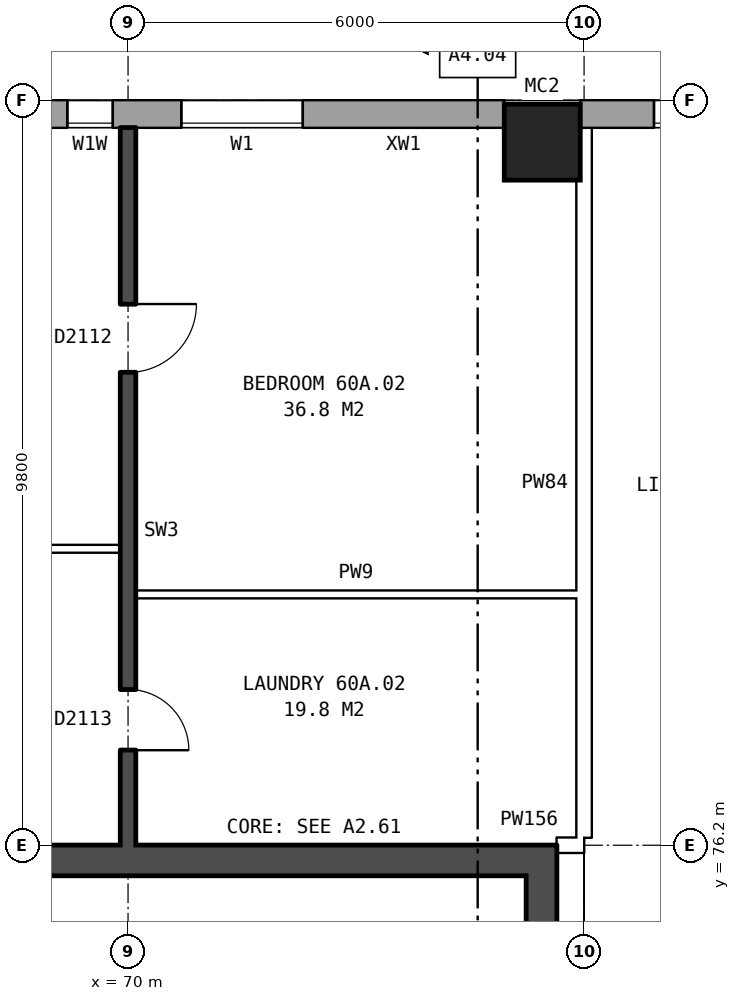
"""IFC4 building model, lengths in metres.
Left out: names, types, materials, properties, quantities, classifications, styles, units other than length and angle.
Written with IfcOpenShell. Run it as: python <this file> out.ifc"""

import sys

from ifc_helpers import new_model, si_unit, direction, frame, frame_2d, origin, origin_2d, place, context, subcontext, project, spatial, rectangle, hollow_rectangle, extrude, element, fill, save


model = new_model("IFC4")
c1 = context("Model", 3, precision=1e-05, world=origin(), true_north=direction((0.0, 1.0)))
c2 = subcontext(c1, "Body", "Model", "MODEL_VIEW")
j1 = project(units=[si_unit("LENGTHUNIT", "METRE"), si_unit("PLANEANGLEUNIT", "RADIAN")], contexts=[c1])
p1 = place(None, origin())
s1 = spatial("IfcSite", under=j1, at=p1, CompositionType="ELEMENT")
p2 = place(p1, origin())
s2 = spatial("IfcBuilding", under=s1, at=p2, CompositionType="ELEMENT")
p3 = place(p2, frame((0.0, 0.0, 212.1)))
s3 = spatial("IfcBuildingStorey", under=s2, at=p3, CompositionType="ELEMENT", Elevation=212.1)
p4 = place(p3, frame((75.45, 85.45, 0.0), z_axis=(0.0, 0.0, 1.0), x_axis=(1.0, 0.0, 0.0)))
e1 = element("IfcColumn", 1, at=p4, inside=s3, PredefinedType="COLUMN", context=c2, shape_type="SweptSolid", body=[
    extrude(hollow_rectangle(XDim=1.0, YDim=1.0, WallThickness=0.055, at=origin_2d()), origin(), (0.0, 0.0, 1.0), 3.1),
])
p5 = place(p3, frame((131.05, 85.82, 0.0), z_axis=(0.0, 0.0, 1.0), x_axis=(-1.0, 0.0, 0.0)))
e2 = element("IfcWall", 2, at=p5, inside=s3, PredefinedType="STANDARD", context=c2, shape_type="SweptSolid", body=[
    extrude(rectangle(XDim=55.1, YDim=0.36, at=frame_2d((27.55, 0.0))), origin(), (0.0, 0.0, 1.0), 2.85),
])
p6 = place(p5, frame((0.969, 0.0, 0.8)))
e3 = element("IfcOpeningElement", 3, at=p6, cuts=e2, PredefinedType="OPENING", context=c2, shape_type="SweptSolid", body=[
    extrude(rectangle(XDim=1.6, YDim=1.8, at=frame_2d((0.8, 0.9))), frame((0.0, 0.19, 0.0), z_axis=(0.0, -1.0, 0.0), x_axis=(1.0, 0.0, 0.0)), (0.0, 0.0, 1.0), 0.38),
])
p7 = place(p5, frame((4.406, 0.0, 0.8)))
e4 = element("IfcOpeningElement", 4, at=p7, cuts=e2, PredefinedType="OPENING", context=c2, shape_type="SweptSolid", body=[
    extrude(rectangle(XDim=1.6, YDim=1.8, at=frame_2d((0.8, 0.9))), frame((0.0, 0.19, 0.0), z_axis=(0.0, -1.0, 0.0), x_axis=(1.0, 0.0, 0.0)), (0.0, 0.0, 1.0), 0.38),
])
p8 = place(p5, frame((7.844, 0.0, 0.8)))
e5 = element("IfcOpeningElement", 5, at=p8, cuts=e2, PredefinedType="OPENING", context=c2, shape_type="SweptSolid", body=[
    extrude(rectangle(XDim=1.6, YDim=1.8, at=frame_2d((0.8, 0.9))), frame((0.0, 0.19, 0.0), z_axis=(0.0, -1.0, 0.0), x_axis=(1.0, 0.0, 0.0)), (0.0, 0.0, 1.0), 0.38),
])
p9 = place(p5, frame((11.281, 0.0, 0.8)))
e6 = element("IfcOpeningElement", 6, at=p9, cuts=e2, PredefinedType="OPENING", context=c2, shape_type="SweptSolid", body=[
    extrude(rectangle(XDim=1.6, YDim=1.8, at=frame_2d((0.8, 0.9))), frame((0.0, 0.19, 0.0), z_axis=(0.0, -1.0, 0.0), x_axis=(1.0, 0.0, 0.0)), (0.0, 0.0, 1.0), 0.38),
])
p10 = place(p5, frame((14.719, 0.0, 0.8)))
e7 = element("IfcOpeningElement", 7, at=p10, cuts=e2, PredefinedType="OPENING", context=c2, shape_type="SweptSolid", body=[
    extrude(rectangle(XDim=1.6, YDim=1.8, at=frame_2d((0.8, 0.9))), frame((0.0, 0.19, 0.0), z_axis=(0.0, -1.0, 0.0), x_axis=(1.0, 0.0, 0.0)), (0.0, 0.0, 1.0), 0.38),
])
p11 = place(p5, frame((18.156, 0.0, 0.8)))
e8 = element("IfcOpeningElement", 8, at=p11, cuts=e2, PredefinedType="OPENING", context=c2, shape_type="SweptSolid", body=[
    extrude(rectangle(XDim=1.6, YDim=1.8, at=frame_2d((0.8, 0.9))), frame((0.0, 0.19, 0.0), z_axis=(0.0, -1.0, 0.0), x_axis=(1.0, 0.0, 0.0)), (0.0, 0.0, 1.0), 0.38),
])
p12 = place(p5, frame((21.594, 0.0, 0.8)))
e9 = element("IfcOpeningElement", 9, at=p12, cuts=e2, PredefinedType="OPENING", context=c2, shape_type="SweptSolid", body=[
    extrude(rectangle(XDim=1.6, YDim=1.8, at=frame_2d((0.8, 0.9))), frame((0.0, 0.19, 0.0), z_axis=(0.0, -1.0, 0.0), x_axis=(1.0, 0.0, 0.0)), (0.0, 0.0, 1.0), 0.38),
])
p13 = place(p5, frame((25.031, 0.0, 0.8)))
e10 = element("IfcOpeningElement", 10, at=p13, cuts=e2, PredefinedType="OPENING", context=c2, shape_type="SweptSolid", body=[
    extrude(rectangle(XDim=1.6, YDim=1.8, at=frame_2d((0.8, 0.9))), frame((0.0, 0.19, 0.0), z_axis=(0.0, -1.0, 0.0), x_axis=(1.0, 0.0, 0.0)), (0.0, 0.0, 1.0), 0.38),
])
p14 = place(p5, frame((28.469, 0.0, 0.8)))
e11 = element("IfcOpeningElement", 11, at=p14, cuts=e2, PredefinedType="OPENING", context=c2, shape_type="SweptSolid", body=[
    extrude(rectangle(XDim=1.6, YDim=1.8, at=frame_2d((0.8, 0.9))), frame((0.0, 0.19, 0.0), z_axis=(0.0, -1.0, 0.0), x_axis=(1.0, 0.0, 0.0)), (0.0, 0.0, 1.0), 0.38),
])
p15 = place(p5, frame((31.906, 0.0, 0.8)))
e12 = element("IfcOpeningElement", 12, at=p15, cuts=e2, PredefinedType="OPENING", context=c2, shape_type="SweptSolid", body=[
    extrude(rectangle(XDim=1.6, YDim=1.8, at=frame_2d((0.8, 0.9))), frame((0.0, 0.19, 0.0), z_axis=(0.0, -1.0, 0.0), x_axis=(1.0, 0.0, 0.0)), (0.0, 0.0, 1.0), 0.38),
])
p16 = place(p5, frame((35.344, 0.0, 0.8)))
e13 = element("IfcOpeningElement", 13, at=p16, cuts=e2, PredefinedType="OPENING", context=c2, shape_type="SweptSolid", body=[
    extrude(rectangle(XDim=1.6, YDim=1.8, at=frame_2d((0.8, 0.9))), frame((0.0, 0.19, 0.0), z_axis=(0.0, -1.0, 0.0), x_axis=(1.0, 0.0, 0.0)), (0.0, 0.0, 1.0), 0.38),
])
p17 = place(p5, frame((38.781, 0.0, 0.8)))
e14 = element("IfcOpeningElement", 14, at=p17, cuts=e2, PredefinedType="OPENING", context=c2, shape_type="SweptSolid", body=[
    extrude(rectangle(XDim=1.6, YDim=1.8, at=frame_2d((0.8, 0.9))), frame((0.0, 0.19, 0.0), z_axis=(0.0, -1.0, 0.0), x_axis=(1.0, 0.0, 0.0)), (0.0, 0.0, 1.0), 0.38),
])
p18 = place(p5, frame((42.219, 0.0, 0.8)))
e15 = element("IfcOpeningElement", 15, at=p18, cuts=e2, PredefinedType="OPENING", context=c2, shape_type="SweptSolid", body=[
    extrude(rectangle(XDim=1.6, YDim=1.8, at=frame_2d((0.8, 0.9))), frame((0.0, 0.19, 0.0), z_axis=(0.0, -1.0, 0.0), x_axis=(1.0, 0.0, 0.0)), (0.0, 0.0, 1.0), 0.38),
])
p19 = place(p5, frame((45.656, 0.0, 0.8)))
e16 = element("IfcOpeningElement", 16, at=p19, cuts=e2, PredefinedType="OPENING", context=c2, shape_type="SweptSolid", body=[
    extrude(rectangle(XDim=1.6, YDim=1.8, at=frame_2d((0.8, 0.9))), frame((0.0, 0.19, 0.0), z_axis=(0.0, -1.0, 0.0), x_axis=(1.0, 0.0, 0.0)), (0.0, 0.0, 1.0), 0.38),
])
p20 = place(p5, frame((49.094, 0.0, 0.8)))
e17 = element("IfcOpeningElement", 17, at=p20, cuts=e2, PredefinedType="OPENING", context=c2, shape_type="SweptSolid", body=[
    extrude(rectangle(XDim=1.6, YDim=1.8, at=frame_2d((0.8, 0.9))), frame((0.0, 0.19, 0.0), z_axis=(0.0, -1.0, 0.0), x_axis=(1.0, 0.0, 0.0)), (0.0, 0.0, 1.0), 0.38),
])
p21 = place(p5, frame((52.531, 0.0, 0.8)))
e18 = element("IfcOpeningElement", 18, at=p21, cuts=e2, PredefinedType="OPENING", context=c2, shape_type="SweptSolid", body=[
    extrude(rectangle(XDim=1.6, YDim=1.8, at=frame_2d((0.8, 0.9))), frame((0.0, 0.19, 0.0), z_axis=(0.0, -1.0, 0.0), x_axis=(1.0, 0.0, 0.0)), (0.0, 0.0, 1.0), 0.38),
])
p22 = place(p3, frame((74.95, 85.82, 0.0), z_axis=(0.0, 0.0, 1.0), x_axis=(-1.0, 0.0, 0.0)))
e19 = element("IfcWall", 19, at=p22, inside=s3, PredefinedType="STANDARD", context=c2, shape_type="SweptSolid", body=[
    extrude(rectangle(XDim=39.875, YDim=0.36, at=frame_2d((19.938, 0.0))), origin(), (0.0, 0.0, 1.0), 2.85),
])
p23 = place(p22, frame((2.65, 0.0, 0.8)))
e20 = element("IfcOpeningElement", 20, at=p23, cuts=e19, PredefinedType="OPENING", context=c2, shape_type="SweptSolid", body=[
    extrude(rectangle(XDim=1.6, YDim=1.8, at=frame_2d((0.8, 0.9))), frame((0.0, 0.19, 0.0), z_axis=(0.0, -1.0, 0.0), x_axis=(1.0, 0.0, 0.0)), (0.0, 0.0, 1.0), 0.38),
])
p24 = place(p22, frame((5.15, 0.0, 1.5)))
e21 = element("IfcOpeningElement", 21, at=p24, cuts=e19, PredefinedType="OPENING", context=c2, shape_type="SweptSolid", body=[
    extrude(rectangle(XDim=0.6, YDim=0.9, at=frame_2d((0.3, 0.45))), frame((0.0, 0.19, 0.0), z_axis=(0.0, -1.0, 0.0), x_axis=(1.0, 0.0, 0.0)), (0.0, 0.0, 1.0), 0.38),
])
p25 = place(p22, frame((8.65, 0.0, 0.8)))
e22 = element("IfcOpeningElement", 22, at=p25, cuts=e19, PredefinedType="OPENING", context=c2, shape_type="SweptSolid", body=[
    extrude(rectangle(XDim=1.6, YDim=1.8, at=frame_2d((0.8, 0.9))), frame((0.0, 0.19, 0.0), z_axis=(0.0, -1.0, 0.0), x_axis=(1.0, 0.0, 0.0)), (0.0, 0.0, 1.0), 0.38),
])
p26 = place(p22, frame((11.65, 0.0, 0.8)))
e23 = element("IfcOpeningElement", 23, at=p26, cuts=e19, PredefinedType="OPENING", context=c2, shape_type="SweptSolid", body=[
    extrude(rectangle(XDim=1.6, YDim=1.8, at=frame_2d((0.8, 0.9))), frame((0.0, 0.19, 0.0), z_axis=(0.0, -1.0, 0.0), x_axis=(1.0, 0.0, 0.0)), (0.0, 0.0, 1.0), 0.38),
])
p27 = place(p22, frame((14.65, 0.0, 0.8)))
e24 = element("IfcOpeningElement", 24, at=p27, cuts=e19, PredefinedType="OPENING", context=c2, shape_type="SweptSolid", body=[
    extrude(rectangle(XDim=1.6, YDim=1.8, at=frame_2d((0.8, 0.9))), frame((0.0, 0.19, 0.0), z_axis=(0.0, -1.0, 0.0), x_axis=(1.0, 0.0, 0.0)), (0.0, 0.0, 1.0), 0.38),
])
p28 = place(p22, frame((17.65, 0.0, 0.8)))
e25 = element("IfcOpeningElement", 25, at=p28, cuts=e19, PredefinedType="OPENING", context=c2, shape_type="SweptSolid", body=[
    extrude(rectangle(XDim=1.6, YDim=1.8, at=frame_2d((0.8, 0.9))), frame((0.0, 0.19, 0.0), z_axis=(0.0, -1.0, 0.0), x_axis=(1.0, 0.0, 0.0)), (0.0, 0.0, 1.0), 0.38),
])
p29 = place(p22, frame((20.65, 0.0, 0.8)))
e26 = element("IfcOpeningElement", 26, at=p29, cuts=e19, PredefinedType="OPENING", context=c2, shape_type="SweptSolid", body=[
    extrude(rectangle(XDim=1.6, YDim=1.8, at=frame_2d((0.8, 0.9))), frame((0.0, 0.19, 0.0), z_axis=(0.0, -1.0, 0.0), x_axis=(1.0, 0.0, 0.0)), (0.0, 0.0, 1.0), 0.38),
])
p30 = place(p22, frame((23.65, 0.0, 0.8)))
e27 = element("IfcOpeningElement", 27, at=p30, cuts=e19, PredefinedType="OPENING", context=c2, shape_type="SweptSolid", body=[
    extrude(rectangle(XDim=1.6, YDim=1.8, at=frame_2d((0.8, 0.9))), frame((0.0, 0.19, 0.0), z_axis=(0.0, -1.0, 0.0), x_axis=(1.0, 0.0, 0.0)), (0.0, 0.0, 1.0), 0.38),
])
p31 = place(p22, frame((26.65, 0.0, 0.8)))
e28 = element("IfcOpeningElement", 28, at=p31, cuts=e19, PredefinedType="OPENING", context=c2, shape_type="SweptSolid", body=[
    extrude(rectangle(XDim=1.6, YDim=1.8, at=frame_2d((0.8, 0.9))), frame((0.0, 0.19, 0.0), z_axis=(0.0, -1.0, 0.0), x_axis=(1.0, 0.0, 0.0)), (0.0, 0.0, 1.0), 0.38),
])
p32 = place(p22, frame((29.65, 0.0, 0.8)))
e29 = element("IfcOpeningElement", 29, at=p32, cuts=e19, PredefinedType="OPENING", context=c2, shape_type="SweptSolid", body=[
    extrude(rectangle(XDim=1.6, YDim=1.8, at=frame_2d((0.8, 0.9))), frame((0.0, 0.19, 0.0), z_axis=(0.0, -1.0, 0.0), x_axis=(1.0, 0.0, 0.0)), (0.0, 0.0, 1.0), 0.38),
])
p33 = place(p22, frame((32.65, 0.0, 0.8)))
e30 = element("IfcOpeningElement", 30, at=p33, cuts=e19, PredefinedType="OPENING", context=c2, shape_type="SweptSolid", body=[
    extrude(rectangle(XDim=1.6, YDim=1.8, at=frame_2d((0.8, 0.9))), frame((0.0, 0.19, 0.0), z_axis=(0.0, -1.0, 0.0), x_axis=(1.0, 0.0, 0.0)), (0.0, 0.0, 1.0), 0.38),
])
p34 = place(p22, frame((36.35, 0.0, 1.1)))
e31 = element("IfcOpeningElement", 31, at=p34, cuts=e19, PredefinedType="OPENING", context=c2, shape_type="SweptSolid", body=[
    extrude(rectangle(XDim=0.8, YDim=1.5, at=frame_2d((0.4, 0.75))), frame((0.0, 0.19, 0.0), z_axis=(0.0, -1.0, 0.0), x_axis=(1.0, 0.0, 0.0)), (0.0, 0.0, 1.0), 0.38),
])
p35 = place(p22, frame((7.45, 0.0, 0.8)))
e32 = element("IfcOpeningElement", 32, at=p35, cuts=e19, PredefinedType="OPENING", context=c2, shape_type="SweptSolid", body=[
    extrude(rectangle(XDim=0.8, YDim=1.5, at=frame_2d((0.4, 0.75))), frame((0.0, 0.19, 0.0), z_axis=(0.0, -1.0, 0.0), x_axis=(1.0, 0.0, 0.0)), (0.0, 0.0, 1.0), 0.38),
])
p36 = place(p22, frame((37.45, 0.0, 0.8)))
e33 = element("IfcOpeningElement", 33, at=p36, cuts=e19, PredefinedType="OPENING", context=c2, shape_type="SweptSolid", body=[
    extrude(rectangle(XDim=1.4, YDim=1.8, at=frame_2d((0.7, 0.9))), frame((0.0, 0.19, 0.0), z_axis=(0.0, -1.0, 0.0), x_axis=(1.0, 0.0, 0.0)), (0.0, 0.0, 1.0), 0.38),
])
p37 = place(p3, frame((75.44, 63.8, 0.0), z_axis=(0.0, 0.0, 1.0), x_axis=(0.0, 1.0, 0.0)))
e34 = element("IfcWall", 34, at=p37, inside=s3, PredefinedType="SHEAR", context=c2, shape_type="SweptSolid", body=[
    extrude(rectangle(XDim=12.4, YDim=0.4, at=frame_2d((6.2, 0.0))), origin(), (0.0, 0.0, 1.0), 2.85),
])
p38 = place(p37, frame((9.8, 0.0, 0.0)))
e35 = element("IfcOpeningElement", 35, at=p38, cuts=e34, PredefinedType="OPENING", context=c2, shape_type="SweptSolid", body=[
    extrude(rectangle(XDim=1.1, YDim=2.1, at=frame_2d((0.55, 1.05))), frame((0.0, 0.21, 0.0), z_axis=(0.0, -1.0, 0.0), x_axis=(1.0, 0.0, 0.0)), (0.0, 0.0, 1.0), 0.42),
])
p39 = place(p3, frame((67.04, 76.0, 0.0), z_axis=(0.0, 0.0, 1.0), x_axis=(1.0, 0.0, 0.0)))
e36 = element("IfcWall", 36, at=p39, inside=s3, PredefinedType="SHEAR", context=c2, shape_type="SweptSolid", body=[
    extrude(rectangle(XDim=8.2, YDim=0.4, at=frame_2d((4.1, 0.0))), origin(), (0.0, 0.0, 1.0), 2.85),
])
p40 = place(p3, frame((75.64, 76.2, 0.0), z_axis=(0.0, 0.0, 1.0), x_axis=(1.0, 0.0, 0.0)))
e37 = element("IfcWall", 37, at=p40, inside=s3, PredefinedType="PARTITIONING", context=c2, shape_type="SweptSolid", body=[
    extrude(rectangle(XDim=0.36, YDim=0.2, at=frame_2d((0.18, 0.0))), origin(), (0.0, 0.0, 1.0), 2.85),
])
p41 = place(p3, frame((70.1, 79.5, 0.0), z_axis=(0.0, 0.0, 1.0), x_axis=(1.0, 0.0, 0.0)))
e38 = element("IfcWall", 38, at=p41, inside=s3, PredefinedType="PARTITIONING", context=c2, shape_type="SweptSolid", body=[
    extrude(rectangle(XDim=5.8, YDim=0.1, at=frame_2d((2.9, 0.0))), origin(), (0.0, 0.0, 1.0), 2.85),
])
p42 = place(p3, frame((64.1, 80.1, 0.0), z_axis=(0.0, 0.0, 1.0), x_axis=(1.0, 0.0, 0.0)))
e39 = element("IfcWall", 39, at=p42, inside=s3, PredefinedType="PARTITIONING", context=c2, shape_type="SweptSolid", body=[
    extrude(rectangle(XDim=5.8, YDim=0.1, at=frame_2d((2.9, 0.0))), origin(), (0.0, 0.0, 1.0), 2.85),
])
p43 = place(p42, frame((3.6, 0.0, 0.0)))
e40 = element("IfcOpeningElement", 40, at=p43, cuts=e39, PredefinedType="OPENING", context=c2, shape_type="SweptSolid", body=[
    extrude(rectangle(XDim=0.9, YDim=2.1, at=frame_2d((0.45, 1.05))), frame((0.0, 0.06, 0.0), z_axis=(0.0, -1.0, 0.0), x_axis=(1.0, 0.0, 0.0)), (0.0, 0.0, 1.0), 0.12),
])
p44 = place(p42, frame((0.7, 0.0, 0.0)))
e41 = element("IfcOpeningElement", 41, at=p44, cuts=e39, PredefinedType="OPENING", context=c2, shape_type="SweptSolid", body=[
    extrude(rectangle(XDim=0.9, YDim=2.1, at=frame_2d((0.45, 1.05))), frame((0.0, 0.06, 0.0), z_axis=(0.0, -1.0, 0.0), x_axis=(1.0, 0.0, 0.0)), (0.0, 0.0, 1.0), 0.12),
])
p45 = place(p3, frame((70.0, 76.2, 0.0), z_axis=(0.0, 0.0, 1.0), x_axis=(0.0, 1.0, 0.0)))
e42 = element("IfcWall", 42, at=p45, inside=s3, PredefinedType="SOLIDWALL", context=c2, shape_type="SweptSolid", body=[
    extrude(rectangle(XDim=9.44, YDim=0.2, at=frame_2d((4.72, 0.0))), origin(), (0.0, 0.0, 1.0), 2.85),
])
p46 = place(p45, frame((6.22, 0.0, 0.0)))
e43 = element("IfcOpeningElement", 43, at=p46, cuts=e42, PredefinedType="OPENING", context=c2, shape_type="SweptSolid", body=[
    extrude(rectangle(XDim=0.9, YDim=2.1, at=frame_2d((0.45, 1.05))), frame((0.0, 0.11, 0.0), z_axis=(0.0, -1.0, 0.0), x_axis=(1.0, 0.0, 0.0)), (0.0, 0.0, 1.0), 0.22),
])
p47 = place(p45, frame((1.25, 0.0, 0.0)))
e44 = element("IfcOpeningElement", 44, at=p47, cuts=e42, PredefinedType="OPENING", context=c2, shape_type="SweptSolid", body=[
    extrude(rectangle(XDim=0.8, YDim=2.1, at=frame_2d((0.4, 1.05))), frame((0.0, 0.11, 0.0), z_axis=(0.0, -1.0, 0.0), x_axis=(1.0, 0.0, 0.0)), (0.0, 0.0, 1.0), 0.22),
])
p48 = place(p3, frame((76.0, 76.3, 0.0), z_axis=(0.0, 0.0, 1.0), x_axis=(0.0, 1.0, 0.0)))
e45 = element("IfcWall", 45, at=p48, inside=s3, PredefinedType="PARTITIONING", context=c2, shape_type="SweptSolid", body=[
    extrude(rectangle(XDim=9.34, YDim=0.2, at=frame_2d((4.67, 0.0))), origin(), (0.0, 0.0, 1.0), 2.85),
])
p49 = place(p21, origin())
e46 = element("IfcWindow", 46, at=p49, inside=s3, PartitioningType="SINGLE_PANEL", PredefinedType="WINDOW", context=c2, shape_type="SweptSolid", body=[
    extrude(rectangle(XDim=1.6, YDim=1.8, at=frame_2d((0.8, 0.9))), frame((0.0, 0.15, 0.0), z_axis=(0.0, -1.0, 0.0), x_axis=(1.0, 0.0, 0.0)), (0.0, 0.0, 1.0), 0.06),
])
fill(e18, e46)
p50 = place(p23, origin())
e47 = element("IfcWindow", 47, at=p50, inside=s3, PartitioningType="SINGLE_PANEL", PredefinedType="WINDOW", context=c2, shape_type="SweptSolid", body=[
    extrude(rectangle(XDim=1.6, YDim=1.8, at=frame_2d((0.8, 0.9))), frame((0.0, 0.15, 0.0), z_axis=(0.0, -1.0, 0.0), x_axis=(1.0, 0.0, 0.0)), (0.0, 0.0, 1.0), 0.06),
])
fill(e20, e47)
p51 = place(p24, origin())
e48 = element("IfcWindow", 48, at=p51, inside=s3, PartitioningType="SINGLE_PANEL", PredefinedType="WINDOW", context=c2, shape_type="SweptSolid", body=[
    extrude(rectangle(XDim=0.6, YDim=0.9, at=frame_2d((0.3, 0.45))), frame((0.0, 0.15, 0.0), z_axis=(0.0, -1.0, 0.0), x_axis=(1.0, 0.0, 0.0)), (0.0, 0.0, 1.0), 0.06),
])
fill(e21, e48)
p52 = place(p46, frame((0.9, 0.0, 0.0), z_axis=(0.0, 0.0, 1.0), x_axis=(-1.0, 0.0, 0.0)))
e49 = element("IfcDoor", 49, at=p52, inside=s3, OperationType="SINGLE_SWING_LEFT", PredefinedType="DOOR", context=c2, shape_type="SweptSolid", body=[
    extrude(rectangle(XDim=0.9, YDim=2.1, at=frame_2d((0.45, 1.05))), frame((0.0, 0.025, 0.0), z_axis=(0.0, -1.0, 0.0), x_axis=(1.0, 0.0, 0.0)), (0.0, 0.0, 1.0), 0.05),
])
fill(e43, e49)
p53 = place(p47, frame((0.8, 0.0, 0.0), z_axis=(0.0, 0.0, 1.0), x_axis=(-1.0, 0.0, 0.0)))
e50 = element("IfcDoor", 50, at=p53, inside=s3, OperationType="SINGLE_SWING_RIGHT", PredefinedType="DOOR", context=c2, shape_type="SweptSolid", body=[
    extrude(rectangle(XDim=0.8, YDim=2.1, at=frame_2d((0.4, 1.05))), frame((0.0, 0.025, 0.0), z_axis=(0.0, -1.0, 0.0), x_axis=(1.0, 0.0, 0.0)), (0.0, 0.0, 1.0), 0.05),
])
fill(e44, e50)
save(model, sys.argv[1])
